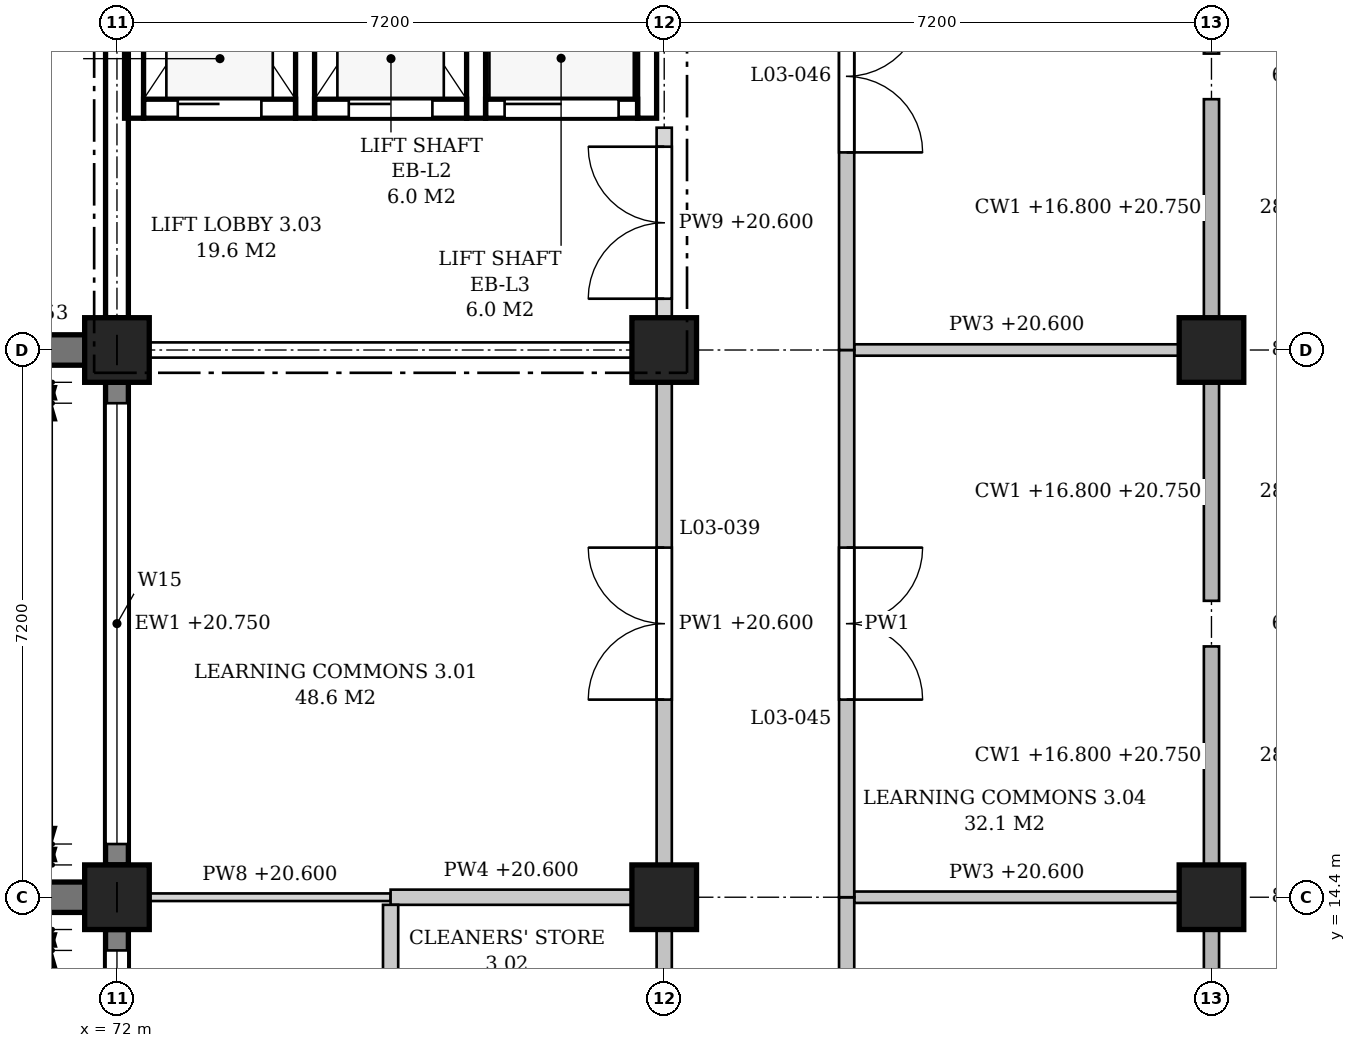
"""IFC4 building model, lengths in metres.
Left out: names, types, materials, properties, quantities, classifications, styles, units other than length and angle.
Written with IfcOpenShell. Run it as: python <this file> out.ifc"""

import sys

from ifc_helpers import new_model, si_unit, direction, frame, frame_2d, origin, origin_2d, place, context, subcontext, project, spatial, polyline, rectangle, outline, extrude, element, fill, save


model = new_model("IFC4")
c1 = context("Model", 3, precision=1e-05, world=origin(), true_north=direction((0.0, 1.0)))
c2 = subcontext(c1, "Body", "Model", "MODEL_VIEW")
j1 = project(units=[si_unit("LENGTHUNIT", "METRE"), si_unit("PLANEANGLEUNIT", "RADIAN")], contexts=[c1])
p1 = place(None, origin())
s1 = spatial("IfcSite", under=j1, at=p1, CompositionType="ELEMENT")
p2 = place(p1, origin())
s2 = spatial("IfcBuilding", under=s1, at=p2, CompositionType="ELEMENT")
p3 = place(p2, frame((0.0, 0.0, 16.8)))
s3 = spatial("IfcBuildingStorey", under=s2, at=p3, CompositionType="ELEMENT", Elevation=16.8)
for number, where, z_axis, x_axis in (
    (1, (72.0, 14.4, 0.0), (0.0, 0.0, 1.0), (1.0, 0.0, 0.0)),
    (2, (72.0, 21.6, 0.0), (0.0, 0.0, 1.0), (1.0, 0.0, 0.0)),
    (3, (79.2, 14.4, 0.0), (0.0, 0.0, 1.0), (1.0, 0.0, 0.0)),
    (4, (79.2, 21.6, 0.0), (0.0, 0.0, 1.0), (1.0, 0.0, 0.0)),
    (5, (86.4, 14.4, 0.0), (0.0, 0.0, 1.0), (1.0, 0.0, 0.0)),
    (6, (86.4, 21.6, 0.0), (0.0, 0.0, 1.0), (1.0, 0.0, 0.0)),
):
    element("IfcColumn", number, at=place(p3, frame(where, z_axis=z_axis, x_axis=x_axis)), inside=s3, PredefinedType="COLUMN", context=c2, shape_type="SweptSolid", body=[
        extrude(rectangle(XDim=0.85, YDim=0.85, at=origin_2d()), origin(), (0.0, 0.0, 1.0), 4.8),
    ])
p4 = place(p3, frame((72.0, 7.625, 0.0), z_axis=(0.0, 0.0, 1.0), x_axis=(0.0, 1.0, 0.0)))
e7 = element("IfcWall", 7, at=p4, inside=s3, PredefinedType="STANDARD", context=c2, shape_type="SweptSolid", body=[
    extrude(rectangle(XDim=6.35, YDim=0.3, at=frame_2d((3.175, 0.0))), origin(), (0.0, 0.0, 1.0), 3.95),
])
p5 = place(p4, frame((0.275, 0.0, 0.9)))
e8 = element("IfcOpeningElement", 8, at=p5, cuts=e7, PredefinedType="OPENING", context=c2, shape_type="SweptSolid", body=[
    extrude(outline(polyline([(0.0, 0.0), (5.8, 0.0), (5.8, 1.0), (2.9, 2.5), (0.0, 1.0), (0.0, 0.0)])), frame((0.0, 0.16, 0.0), z_axis=(0.0, -1.0, 0.0), x_axis=(1.0, 0.0, 0.0)), (0.0, 0.0, 1.0), 0.32),
])
p6 = place(p3, frame((72.0, 14.825, 0.0), z_axis=(0.0, 0.0, 1.0), x_axis=(0.0, 1.0, 0.0)))
e9 = element("IfcWall", 9, at=p6, inside=s3, PredefinedType="STANDARD", context=c2, shape_type="SweptSolid", body=[
    extrude(rectangle(XDim=6.35, YDim=0.3, at=frame_2d((3.175, 0.0))), origin(), (0.0, 0.0, 1.0), 3.95),
])
p7 = place(p6, frame((0.275, 0.0, 0.9)))
e10 = element("IfcOpeningElement", 10, at=p7, cuts=e9, PredefinedType="OPENING", context=c2, shape_type="SweptSolid", body=[
    extrude(outline(polyline([(0.0, 0.0), (5.8, 0.0), (5.8, 1.0), (2.9, 2.5), (0.0, 1.0), (0.0, 0.0)])), frame((0.0, 0.16, 0.0), z_axis=(0.0, -1.0, 0.0), x_axis=(1.0, 0.0, 0.0)), (0.0, 0.0, 1.0), 0.32),
])
p8 = place(p3, frame((72.0, 22.025, 0.0), z_axis=(0.0, 0.0, 1.0), x_axis=(0.0, 1.0, 0.0)))
e11 = element("IfcWall", 11, at=p8, inside=s3, PredefinedType="STANDARD", context=c2, shape_type="SweptSolid", body=[
    extrude(rectangle(XDim=6.35, YDim=0.3, at=frame_2d((3.175, 0.0))), origin(), (0.0, 0.0, 1.0), 3.95),
])
for number, where, z_axis, x_axis in (
    (12, (71.575, 14.4, 0.0), (0.0, 0.0, 1.0), (-1.0, 0.0, 0.0)),
    (13, (71.575, 21.6, 0.0), (0.0, 0.0, 1.0), (-1.0, 0.0, 0.0)),
):
    element("IfcWall", number, at=place(p3, frame(where, z_axis=z_axis, x_axis=x_axis)), inside=s3, PredefinedType="POLYGONAL", context=c2, shape_type="SweptSolid", body=[
        extrude(outline(polyline([(0.6, 0.0), (0.6, 4.55), (0.0, 4.55), (0.0, 0.0), (0.6, 0.0)])), frame((0.0, 0.2, 0.0), z_axis=(0.0, -1.0, 0.0), x_axis=(1.0, 0.0, 0.0)), (0.0, 0.0, 1.0), 0.4),
    ])
p9 = place(p3, frame((72.225, 24.65, -0.25), z_axis=(0.0, 0.0, 1.0), x_axis=(0.0, 1.0, 0.0)))
e14 = element("IfcWall", 14, at=p9, inside=s3, PredefinedType="SHEAR", context=c2, shape_type="SweptSolid", body=[
    extrude(rectangle(XDim=3.725, YDim=0.25, at=frame_2d((1.863, 0.0))), origin(), (0.0, 0.0, 1.0), 4.8),
])
for number, where, z_axis, x_axis in (
    (15, (74.475, 24.65, -0.25), (0.0, 0.0, 1.0), (0.0, 1.0, 0.0)),
    (16, (76.725, 24.65, -0.25), (0.0, 0.0, 1.0), (0.0, 1.0, 0.0)),
):
    element("IfcWall", number, at=place(p3, frame(where, z_axis=z_axis, x_axis=x_axis)), inside=s3, PredefinedType="SHEAR", context=c2, shape_type="SweptSolid", body=[
        extrude(rectangle(XDim=3.5, YDim=0.25, at=frame_2d((1.75, 0.0))), origin(), (0.0, 0.0, 1.0), 4.8),
    ])
p10 = place(p3, frame((78.975, 24.65, -0.25), z_axis=(0.0, 0.0, 1.0), x_axis=(0.0, 1.0, 0.0)))
e17 = element("IfcWall", 17, at=p10, inside=s3, PredefinedType="SHEAR", context=c2, shape_type="SweptSolid", body=[
    extrude(rectangle(XDim=3.725, YDim=0.25, at=frame_2d((1.863, 0.0))), origin(), (0.0, 0.0, 1.0), 4.8),
])
p11 = place(p3, frame((72.35, 24.775, -0.25), z_axis=(0.0, 0.0, 1.0), x_axis=(1.0, 0.0, 0.0)))
e18 = element("IfcWall", 18, at=p11, inside=s3, PredefinedType="SHEAR", context=c2, shape_type="SweptSolid", body=[
    extrude(rectangle(XDim=2.0, YDim=0.25, at=frame_2d((1.0, 0.0))), origin(), (0.0, 0.0, 1.0), 4.8),
])
p12 = place(p11, frame((0.45, 0.0, 0.25)))
e19 = element("IfcOpeningElement", 19, at=p12, cuts=e18, PredefinedType="OPENING", context=c2, shape_type="SweptSolid", body=[
    extrude(rectangle(XDim=1.1, YDim=2.1, at=frame_2d((0.55, 1.05))), frame((0.0, 0.135, 0.0), z_axis=(0.0, -1.0, 0.0), x_axis=(1.0, 0.0, 0.0)), (0.0, 0.0, 1.0), 0.27),
])
p13 = place(p3, frame((74.6, 24.775, -0.25), z_axis=(0.0, 0.0, 1.0), x_axis=(1.0, 0.0, 0.0)))
e20 = element("IfcWall", 20, at=p13, inside=s3, PredefinedType="SHEAR", context=c2, shape_type="SweptSolid", body=[
    extrude(rectangle(XDim=2.0, YDim=0.25, at=frame_2d((1.0, 0.0))), origin(), (0.0, 0.0, 1.0), 4.8),
])
p14 = place(p13, frame((0.45, 0.0, 0.25)))
e21 = element("IfcOpeningElement", 21, at=p14, cuts=e20, PredefinedType="OPENING", context=c2, shape_type="SweptSolid", body=[
    extrude(rectangle(XDim=1.1, YDim=2.1, at=frame_2d((0.55, 1.05))), frame((0.0, 0.135, 0.0), z_axis=(0.0, -1.0, 0.0), x_axis=(1.0, 0.0, 0.0)), (0.0, 0.0, 1.0), 0.27),
])
p15 = place(p3, frame((76.85, 24.775, -0.25), z_axis=(0.0, 0.0, 1.0), x_axis=(1.0, 0.0, 0.0)))
e22 = element("IfcWall", 22, at=p15, inside=s3, PredefinedType="SHEAR", context=c2, shape_type="SweptSolid", body=[
    extrude(rectangle(XDim=2.0, YDim=0.25, at=frame_2d((1.0, 0.0))), origin(), (0.0, 0.0, 1.0), 4.8),
])
p16 = place(p15, frame((0.25, 0.0, 0.25)))
e23 = element("IfcOpeningElement", 23, at=p16, cuts=e22, PredefinedType="OPENING", context=c2, shape_type="SweptSolid", body=[
    extrude(rectangle(XDim=1.5, YDim=2.1, at=frame_2d((0.75, 1.05))), frame((0.0, 0.135, 0.0), z_axis=(0.0, -1.0, 0.0), x_axis=(1.0, 0.0, 0.0)), (0.0, 0.0, 1.0), 0.27),
])
p17 = place(p3, frame((72.425, 14.4, 0.0), z_axis=(0.0, 0.0, 1.0), x_axis=(1.0, 0.0, 0.0)))
e24 = element("IfcWall", 24, at=p17, inside=s3, PredefinedType="PARTITIONING", context=c2, shape_type="SweptSolid", body=[
    extrude(rectangle(XDim=3.175, YDim=0.1, at=frame_2d((1.587, 0.0))), origin(), (0.0, 0.0, 1.0), 3.8),
])
p18 = place(p3, frame((75.6, 14.4, 0.0), z_axis=(0.0, 0.0, 1.0), x_axis=(1.0, 0.0, 0.0)))
e25 = element("IfcWall", 25, at=p18, inside=s3, PredefinedType="PARTITIONING", context=c2, shape_type="SweptSolid", body=[
    extrude(rectangle(XDim=3.175, YDim=0.2, at=frame_2d((1.587, 0.0))), origin(), (0.0, 0.0, 1.0), 3.8),
])
p19 = place(p3, frame((81.7, 14.4, 0.0), z_axis=(0.0, 0.0, 1.0), x_axis=(1.0, 0.0, 0.0)))
e26 = element("IfcWall", 26, at=p19, inside=s3, PredefinedType="PARTITIONING", context=c2, shape_type="SweptSolid", body=[
    extrude(rectangle(XDim=4.275, YDim=0.15, at=frame_2d((2.138, 0.0))), origin(), (0.0, 0.0, 1.0), 3.8),
])
p20 = place(p3, frame((72.425, 21.6, 0.0), z_axis=(0.0, 0.0, 1.0), x_axis=(1.0, 0.0, 0.0)))
e27 = element("IfcWall", 27, at=p20, inside=s3, PredefinedType="PARTITIONING", context=c2, shape_type="SweptSolid", body=[
    extrude(rectangle(XDim=6.35, YDim=0.2, at=frame_2d((3.175, 0.0))), origin(), (0.0, 0.0, 1.0), 3.8),
])
p21 = place(p3, frame((81.7, 21.6, 0.0), z_axis=(0.0, 0.0, 1.0), x_axis=(1.0, 0.0, 0.0)))
e28 = element("IfcWall", 28, at=p21, inside=s3, PredefinedType="PARTITIONING", context=c2, shape_type="SweptSolid", body=[
    extrude(rectangle(XDim=4.275, YDim=0.15, at=frame_2d((2.138, 0.0))), origin(), (0.0, 0.0, 1.0), 3.8),
])
p22 = place(p3, frame((75.6, 10.9, 0.0), z_axis=(0.0, 0.0, 1.0), x_axis=(0.0, 1.0, 0.0)))
e29 = element("IfcWall", 29, at=p22, inside=s3, PredefinedType="PARTITIONING", context=c2, shape_type="SweptSolid", body=[
    extrude(outline(polyline([(0.0, 0.0), (3.4, 0.0), (3.4, 3.8), (3.25, 3.8), (3.25, 4.55), (0.0, 4.55), (0.0, 0.0)])), frame((0.0, 0.1, 0.0), z_axis=(0.0, -1.0, 0.0), x_axis=(1.0, 0.0, 0.0)), (0.0, 0.0, 1.0), 0.2),
])
p23 = place(p3, frame((79.2, 10.9, 0.0), z_axis=(0.0, 0.0, 1.0), x_axis=(0.0, 1.0, 0.0)))
e30 = element("IfcWall", 30, at=p23, inside=s3, PredefinedType="PARTITIONING", context=c2, shape_type="SweptSolid", body=[
    extrude(rectangle(XDim=3.075, YDim=0.2, at=frame_2d((1.538, 0.0))), origin(), (0.0, 0.0, 1.0), 3.8),
])
p24 = place(p3, frame((79.2, 14.825, 0.0), z_axis=(0.0, 0.0, 1.0), x_axis=(0.0, 1.0, 0.0)))
e31 = element("IfcWall", 31, at=p24, inside=s3, PredefinedType="PARTITIONING", context=c2, shape_type="SweptSolid", body=[
    extrude(rectangle(XDim=6.35, YDim=0.2, at=frame_2d((3.175, 0.0))), origin(), (0.0, 0.0, 1.0), 3.8),
])
p25 = place(p24, frame((2.175, 0.0, 0.0)))
e32 = element("IfcOpeningElement", 32, at=p25, cuts=e31, PredefinedType="OPENING", context=c2, shape_type="SweptSolid", body=[
    extrude(rectangle(XDim=2.0, YDim=2.1, at=frame_2d((1.0, 1.05))), frame((0.0, 0.11, 0.0), z_axis=(0.0, -1.0, 0.0), x_axis=(1.0, 0.0, 0.0)), (0.0, 0.0, 1.0), 0.22),
])
p26 = place(p3, frame((79.2, 22.025, 0.0), z_axis=(0.0, 0.0, 1.0), x_axis=(0.0, 1.0, 0.0)))
e33 = element("IfcWall", 33, at=p26, inside=s3, PredefinedType="PARTITIONING", context=c2, shape_type="SweptSolid", body=[
    extrude(rectangle(XDim=2.5, YDim=0.2, at=frame_2d((1.25, 0.0))), origin(), (0.0, 0.0, 1.0), 3.8),
])
p27 = place(p26, frame((0.25, 0.0, 0.0)))
e34 = element("IfcOpeningElement", 34, at=p27, cuts=e33, PredefinedType="OPENING", context=c2, shape_type="SweptSolid", body=[
    extrude(rectangle(XDim=2.0, YDim=2.4, at=frame_2d((1.0, 1.2))), frame((0.0, 0.11, 0.0), z_axis=(0.0, -1.0, 0.0), x_axis=(1.0, 0.0, 0.0)), (0.0, 0.0, 1.0), 0.22),
])
p28 = place(p3, frame((81.6, 7.325, 0.0), z_axis=(0.0, 0.0, 1.0), x_axis=(0.0, 1.0, 0.0)))
e35 = element("IfcWall", 35, at=p28, inside=s3, PredefinedType="PARTITIONING", context=c2, shape_type="SweptSolid", body=[
    extrude(outline(polyline([(0.0, 0.0), (7.075, 0.0), (7.075, 3.8), (6.825, 3.8), (6.825, 4.55), (0.125, 4.55), (0.125, 3.8), (0.0, 3.8), (0.0, 0.0)])), frame((0.0, 0.1, 0.0), z_axis=(0.0, -1.0, 0.0), x_axis=(1.0, 0.0, 0.0)), (0.0, 0.0, 1.0), 0.2),
])
p29 = place(p28, frame((3.037, 0.0, 0.0)))
e36 = element("IfcOpeningElement", 36, at=p29, cuts=e35, PredefinedType="OPENING", context=c2, shape_type="SweptSolid", body=[
    extrude(rectangle(XDim=1.0, YDim=2.1, at=frame_2d((0.5, 1.05))), frame((0.0, 0.11, 0.0), z_axis=(0.0, -1.0, 0.0), x_axis=(1.0, 0.0, 0.0)), (0.0, 0.0, 1.0), 0.22),
])
p30 = place(p3, frame((81.6, 14.4, 0.0), z_axis=(0.0, 0.0, 1.0), x_axis=(0.0, 1.0, 0.0)))
e37 = element("IfcWall", 37, at=p30, inside=s3, PredefinedType="PARTITIONING", context=c2, shape_type="SweptSolid", body=[
    extrude(outline(polyline([(0.0, 0.0), (7.2, 0.0), (7.2, 3.8), (6.95, 3.8), (6.95, 4.55), (0.25, 4.55), (0.25, 3.8), (0.0, 3.8), (0.0, 0.0)])), frame((0.0, 0.1, 0.0), z_axis=(0.0, -1.0, 0.0), x_axis=(1.0, 0.0, 0.0)), (0.0, 0.0, 1.0), 0.2),
])
p31 = place(p30, frame((2.6, 0.0, 0.0)))
e38 = element("IfcOpeningElement", 38, at=p31, cuts=e37, PredefinedType="OPENING", context=c2, shape_type="SweptSolid", body=[
    extrude(rectangle(XDim=2.0, YDim=2.1, at=frame_2d((1.0, 1.05))), frame((0.0, 0.11, 0.0), z_axis=(0.0, -1.0, 0.0), x_axis=(1.0, 0.0, 0.0)), (0.0, 0.0, 1.0), 0.22),
])
p32 = place(p3, frame((81.6, 21.6, 0.0), z_axis=(0.0, 0.0, 1.0), x_axis=(0.0, 1.0, 0.0)))
e39 = element("IfcWall", 39, at=p32, inside=s3, PredefinedType="PARTITIONING", context=c2, shape_type="SweptSolid", body=[
    extrude(outline(polyline([(0.0, 0.0), (7.2, 0.0), (7.2, 3.8), (6.95, 3.8), (6.95, 4.55), (0.25, 4.55), (0.25, 3.8), (0.0, 3.8), (0.0, 0.0)])), frame((0.0, 0.1, 0.0), z_axis=(0.0, -1.0, 0.0), x_axis=(1.0, 0.0, 0.0)), (0.0, 0.0, 1.0), 0.2),
])
p33 = place(p32, frame((2.6, 0.0, 0.0)))
e40 = element("IfcOpeningElement", 40, at=p33, cuts=e39, PredefinedType="OPENING", context=c2, shape_type="SweptSolid", body=[
    extrude(rectangle(XDim=2.0, YDim=2.1, at=frame_2d((1.0, 1.05))), frame((0.0, 0.11, 0.0), z_axis=(0.0, -1.0, 0.0), x_axis=(1.0, 0.0, 0.0)), (0.0, 0.0, 1.0), 0.22),
])
p34 = place(p5, origin())
e41 = element("IfcWindow", 41, at=p34, inside=s3, PartitioningType="TRIPLE_PANEL_VERTICAL", PredefinedType="WINDOW", context=c2, shape_type="SweptSolid", body=[
    extrude(outline(polyline([(0.0, 0.0), (5.8, 0.0), (5.8, 1.0), (2.9, 2.5), (0.0, 1.0), (0.0, 0.0)])), frame((0.0, 0.03, 0.0), z_axis=(0.0, -1.0, 0.0), x_axis=(1.0, 0.0, 0.0)), (0.0, 0.0, 1.0), 0.06),
])
fill(e8, e41)
p35 = place(p7, origin())
e42 = element("IfcWindow", 42, at=p35, inside=s3, PartitioningType="TRIPLE_PANEL_VERTICAL", PredefinedType="WINDOW", context=c2, shape_type="SweptSolid", body=[
    extrude(outline(polyline([(0.0, 0.0), (5.8, 0.0), (5.8, 1.0), (2.9, 2.5), (0.0, 1.0), (0.0, 0.0)])), frame((0.0, 0.03, 0.0), z_axis=(0.0, -1.0, 0.0), x_axis=(1.0, 0.0, 0.0)), (0.0, 0.0, 1.0), 0.06),
])
fill(e10, e42)
p36 = place(p12, origin())
e43 = element("IfcDoor", 43, at=p36, inside=s3, OperationType="SLIDING_TO_LEFT", PredefinedType="DOOR", context=c2, shape_type="SweptSolid", body=[
    extrude(rectangle(XDim=1.1, YDim=2.1, at=frame_2d((0.55, 1.05))), frame((0.0, 0.025, 0.0), z_axis=(0.0, -1.0, 0.0), x_axis=(1.0, 0.0, 0.0)), (0.0, 0.0, 1.0), 0.05),
])
fill(e19, e43)
p37 = place(p14, origin())
e44 = element("IfcDoor", 44, at=p37, inside=s3, OperationType="SLIDING_TO_LEFT", PredefinedType="DOOR", context=c2, shape_type="SweptSolid", body=[
    extrude(rectangle(XDim=1.1, YDim=2.1, at=frame_2d((0.55, 1.05))), frame((0.0, 0.025, 0.0), z_axis=(0.0, -1.0, 0.0), x_axis=(1.0, 0.0, 0.0)), (0.0, 0.0, 1.0), 0.05),
])
fill(e21, e44)
p38 = place(p16, origin())
e45 = element("IfcDoor", 45, at=p38, inside=s3, OperationType="SLIDING_TO_LEFT", PredefinedType="DOOR", context=c2, shape_type="SweptSolid", body=[
    extrude(rectangle(XDim=1.5, YDim=2.1, at=frame_2d((0.75, 1.05))), frame((0.0, 0.025, 0.0), z_axis=(0.0, -1.0, 0.0), x_axis=(1.0, 0.0, 0.0)), (0.0, 0.0, 1.0), 0.05),
])
fill(e23, e45)
p39 = place(p27, origin())
e46 = element("IfcDoor", 46, at=p39, inside=s3, OperationType="DOUBLE_DOOR_SINGLE_SWING", PredefinedType="DOOR", context=c2, shape_type="SweptSolid", body=[
    extrude(rectangle(XDim=2.0, YDim=2.4, at=frame_2d((1.0, 1.2))), frame((0.0, 0.025, 0.0), z_axis=(0.0, -1.0, 0.0), x_axis=(1.0, 0.0, 0.0)), (0.0, 0.0, 1.0), 0.05),
])
fill(e34, e46)
p40 = place(p25, origin())
e47 = element("IfcDoor", 47, at=p40, inside=s3, OperationType="DOUBLE_DOOR_SINGLE_SWING", PredefinedType="DOOR", context=c2, shape_type="SweptSolid", body=[
    extrude(rectangle(XDim=2.0, YDim=2.1, at=frame_2d((1.0, 1.05))), frame((0.0, 0.025, 0.0), z_axis=(0.0, -1.0, 0.0), x_axis=(1.0, 0.0, 0.0)), (0.0, 0.0, 1.0), 0.05),
])
fill(e32, e47)
p41 = place(p31, origin())
e48 = element("IfcDoor", 48, at=p41, inside=s3, OperationType="DOUBLE_DOOR_SINGLE_SWING", PredefinedType="DOOR", context=c2, shape_type="SweptSolid", body=[
    extrude(rectangle(XDim=2.0, YDim=2.1, at=frame_2d((1.0, 1.05))), frame((0.0, 0.025, 0.0), z_axis=(0.0, -1.0, 0.0), x_axis=(1.0, 0.0, 0.0)), (0.0, 0.0, 1.0), 0.05),
])
fill(e38, e48)
p42 = place(p33, origin())
e49 = element("IfcDoor", 49, at=p42, inside=s3, OperationType="DOUBLE_DOOR_SINGLE_SWING", PredefinedType="DOOR", context=c2, shape_type="SweptSolid", body=[
    extrude(rectangle(XDim=2.0, YDim=2.1, at=frame_2d((1.0, 1.05))), frame((0.0, 0.025, 0.0), z_axis=(0.0, -1.0, 0.0), x_axis=(1.0, 0.0, 0.0)), (0.0, 0.0, 1.0), 0.05),
])
fill(e40, e49)
save(model, sys.argv[1])
